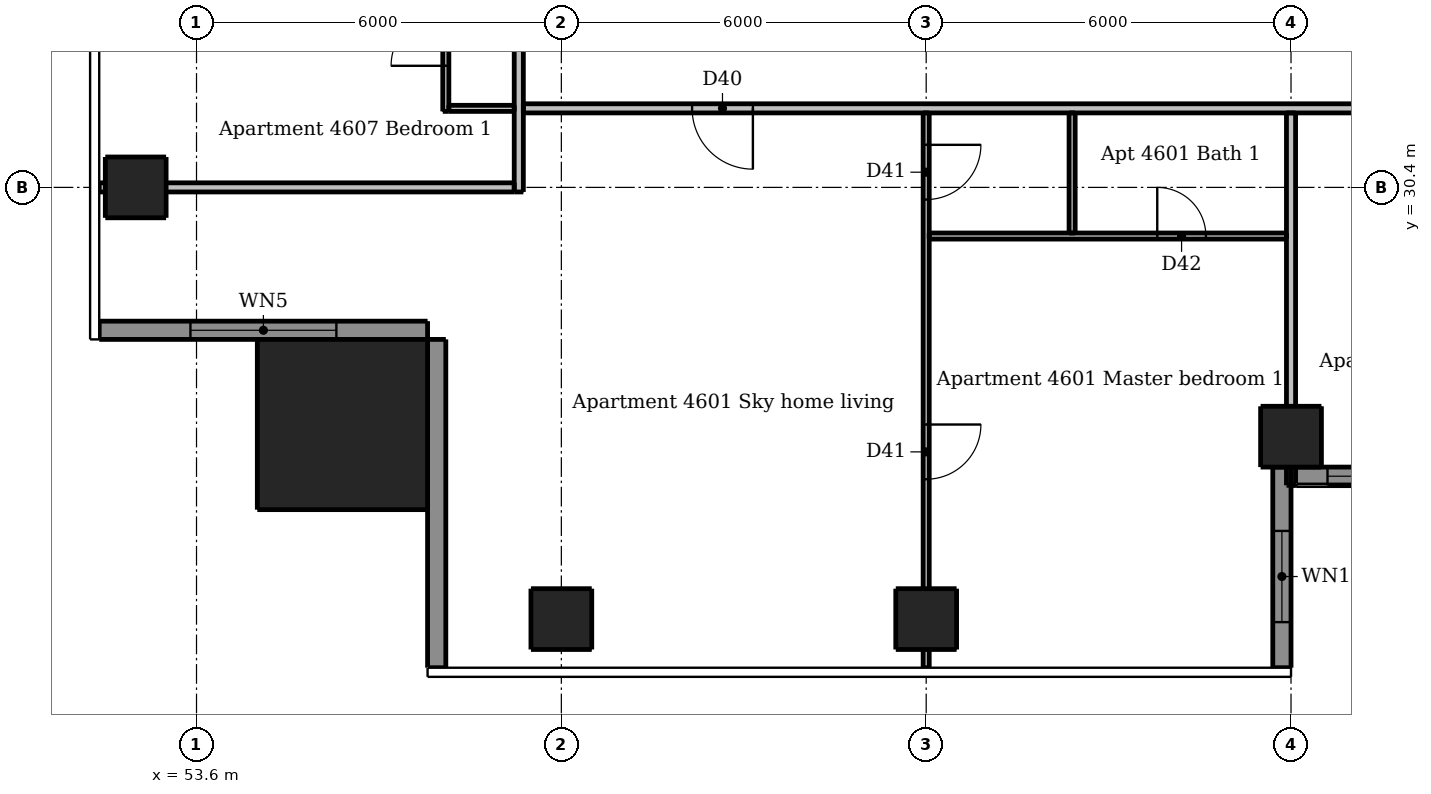
"""IFC4 building model, lengths in metres.
Left out: names, types, materials, properties, quantities, classifications, styles, units other than length and angle.
Written with IfcOpenShell. Run it as: python <this file> out.ifc"""

import sys

from ifc_helpers import new_model, si_unit, direction, frame, frame_2d, origin, origin_2d, place, context, subcontext, project, spatial, rectangle, extrude, element, fill, save


model = new_model("IFC4")
c1 = context("Model", 3, precision=1e-05, world=origin(), true_north=direction((0.0, 1.0)))
c2 = subcontext(c1, "Body", "Model", "MODEL_VIEW")
j1 = project(units=[si_unit("LENGTHUNIT", "METRE"), si_unit("PLANEANGLEUNIT", "RADIAN")], contexts=[c1])
p1 = place(None, origin())
s1 = spatial("IfcSite", under=j1, at=p1, CompositionType="ELEMENT")
p2 = place(p1, origin())
s2 = spatial("IfcBuilding", under=s1, at=p2, CompositionType="ELEMENT")
p3 = place(p2, frame((0.0, 0.0, 171.4)))
s3 = spatial("IfcBuildingStorey", under=s2, at=p3, CompositionType="ELEMENT", Elevation=171.4)
for number, where, z_axis, x_axis in (
    (1, (59.6, 23.3, 0.0), (0.0, 0.0, 1.0), (1.0, 0.0, 0.0)),
    (2, (65.6, 23.3, 0.0), (0.0, 0.0, 1.0), (1.0, 0.0, 0.0)),
    (3, (71.6, 26.3, 0.0), (0.0, 0.0, 1.0), (1.0, 0.0, 0.0)),
    (4, (52.6, 30.4, 0.0), (0.0, 0.0, 1.0), (1.0, 0.0, 0.0)),
):
    element("IfcColumn", number, at=place(p3, frame(where, z_axis=z_axis, x_axis=x_axis)), inside=s3, PredefinedType="COLUMN", context=c2, shape_type="SweptSolid", body=[
        extrude(rectangle(XDim=1.0, YDim=1.0, at=origin_2d()), origin(), (0.0, 0.0, 1.0), 3.05),
    ])
p4 = place(p3, frame((56.0, 26.5, 0.0), z_axis=(0.0, 0.0, 1.0), x_axis=(1.0, 0.0, 0.0)))
e5 = element("IfcColumn", 5, at=p4, inside=s3, PredefinedType="COLUMN", context=c2, shape_type="SweptSolid", body=[
    extrude(rectangle(XDim=2.8, YDim=2.8, at=origin_2d()), origin(), (0.0, 0.0, 1.0), 3.3),
])
p5 = place(p3, frame((71.45, 22.5, 0.0), z_axis=(0.0, 0.0, 1.0), x_axis=(0.0, 1.0, 0.0)))
e6 = element("IfcWall", 6, at=p5, inside=s3, PredefinedType="SOLIDWALL", context=c2, shape_type="SweptSolid", body=[
    extrude(rectangle(XDim=3.3, YDim=0.3, at=frame_2d((1.65, 0.0))), origin(), (0.0, 0.0, 1.0), 3.05),
])
p6 = place(p5, frame((0.75, 0.0, 0.9)))
e7 = element("IfcOpeningElement", 7, at=p6, cuts=e6, PredefinedType="OPENING", context=c2, shape_type="SweptSolid", body=[
    extrude(rectangle(XDim=1.5, YDim=1.5, at=frame_2d((0.75, 0.75))), frame((0.0, 0.16, 0.0), z_axis=(0.0, -1.0, 0.0), x_axis=(1.0, 0.0, 0.0)), (0.0, 0.0, 1.0), 0.32),
])
p7 = place(p3, frame((52.0, 28.05, 0.0), z_axis=(0.0, 0.0, 1.0), x_axis=(1.0, 0.0, 0.0)))
e8 = element("IfcWall", 8, at=p7, inside=s3, PredefinedType="SOLIDWALL", context=c2, shape_type="SweptSolid", body=[
    extrude(rectangle(XDim=5.4, YDim=0.3, at=frame_2d((2.7, 0.0))), origin(), (0.0, 0.0, 1.0), 3.05),
])
p8 = place(p7, frame((1.5, 0.0, 0.15)))
e9 = element("IfcOpeningElement", 9, at=p8, cuts=e8, PredefinedType="OPENING", context=c2, shape_type="SweptSolid", body=[
    extrude(rectangle(XDim=2.4, YDim=2.1, at=frame_2d((1.2, 1.05))), frame((0.0, 0.16, 0.0), z_axis=(0.0, -1.0, 0.0), x_axis=(1.0, 0.0, 0.0)), (0.0, 0.0, 1.0), 0.32),
])
p9 = place(p3, frame((57.55, 27.9, 0.0), z_axis=(0.0, 0.0, 1.0), x_axis=(0.0, -1.0, 0.0)))
e10 = element("IfcWall", 10, at=p9, inside=s3, PredefinedType="SOLIDWALL", context=c2, shape_type="SweptSolid", body=[
    extrude(rectangle(XDim=5.4, YDim=0.3, at=frame_2d((2.7, 0.0))), origin(), (0.0, 0.0, 1.0), 3.05),
])
p10 = place(p3, frame((71.6, 25.65, 0.0), z_axis=(0.0, 0.0, 1.0), x_axis=(1.0, 0.0, 0.0)))
e11 = element("IfcWall", 11, at=p10, inside=s3, PredefinedType="SOLIDWALL", context=c2, shape_type="SweptSolid", body=[
    extrude(rectangle(XDim=6.0, YDim=0.3, at=frame_2d((3.0, 0.0))), origin(), (0.0, 0.0, 1.0), 3.05),
])
p11 = place(p10, frame((0.6, 0.0, 0.15)))
e12 = element("IfcOpeningElement", 12, at=p11, cuts=e11, PredefinedType="OPENING", context=c2, shape_type="SweptSolid", body=[
    extrude(rectangle(XDim=1.8, YDim=2.1, at=frame_2d((0.9, 1.05))), frame((0.0, 0.16, 0.0), z_axis=(0.0, -1.0, 0.0), x_axis=(1.0, 0.0, 0.0)), (0.0, 0.0, 1.0), 0.32),
])
p12 = place(p10, frame((3.6, 0.0, 0.15)))
e13 = element("IfcOpeningElement", 13, at=p12, cuts=e11, PredefinedType="OPENING", context=c2, shape_type="SweptSolid", body=[
    extrude(rectangle(XDim=1.8, YDim=2.1, at=frame_2d((0.9, 1.05))), frame((0.0, 0.16, 0.0), z_axis=(0.0, -1.0, 0.0), x_axis=(1.0, 0.0, 0.0)), (0.0, 0.0, 1.0), 0.32),
])
p13 = place(p3, frame((57.7, 31.65, 0.0), z_axis=(0.0, 0.0, 1.0), x_axis=(0.0, 1.0, 0.0)))
e14 = element("IfcWall", 14, at=p13, inside=s3, PredefinedType="PARTITIONING", context=c2, shape_type="SweptSolid", body=[
    extrude(rectangle(XDim=16.675, YDim=0.1, at=frame_2d((8.337, 0.0))), origin(), (0.0, 0.0, 1.0), 3.05),
])
p14 = place(p13, frame((12.1, 0.0, 0.0)))
e15 = element("IfcOpeningElement", 15, at=p14, cuts=e14, PredefinedType="OPENING", context=c2, shape_type="SweptSolid", body=[
    extrude(rectangle(XDim=0.9, YDim=2.1, at=frame_2d((0.45, 1.05))), frame((0.0, 0.06, 0.0), z_axis=(0.0, -1.0, 0.0), x_axis=(1.0, 0.0, 0.0)), (0.0, 0.0, 1.0), 0.12),
])
p15 = place(p13, frame((15.1, 0.0, 0.0)))
e16 = element("IfcOpeningElement", 16, at=p15, cuts=e14, PredefinedType="OPENING", context=c2, shape_type="SweptSolid", body=[
    extrude(rectangle(XDim=0.9, YDim=2.1, at=frame_2d((0.45, 1.05))), frame((0.0, 0.06, 0.0), z_axis=(0.0, -1.0, 0.0), x_axis=(1.0, 0.0, 0.0)), (0.0, 0.0, 1.0), 0.12),
])
p16 = place(p13, frame((0.75, 0.0, 0.0)))
e17 = element("IfcOpeningElement", 17, at=p16, cuts=e14, PredefinedType="OPENING", context=c2, shape_type="SweptSolid", body=[
    extrude(rectangle(XDim=0.9, YDim=2.1, at=frame_2d((0.45, 1.05))), frame((0.0, 0.06, 0.0), z_axis=(0.0, -1.0, 0.0), x_axis=(1.0, 0.0, 0.0)), (0.0, 0.0, 1.0), 0.12),
])
p17 = place(p13, frame((6.1, 0.0, 0.0)))
e18 = element("IfcOpeningElement", 18, at=p17, cuts=e14, PredefinedType="OPENING", context=c2, shape_type="SweptSolid", body=[
    extrude(rectangle(XDim=0.9, YDim=2.1, at=frame_2d((0.45, 1.05))), frame((0.0, 0.06, 0.0), z_axis=(0.0, -1.0, 0.0), x_axis=(1.0, 0.0, 0.0)), (0.0, 0.0, 1.0), 0.12),
])
p18 = place(p13, frame((3.15, 0.0, 0.0)))
e19 = element("IfcOpeningElement", 19, at=p18, cuts=e14, PredefinedType="OPENING", context=c2, shape_type="SweptSolid", body=[
    extrude(rectangle(XDim=0.8, YDim=2.1, at=frame_2d((0.4, 1.05))), frame((0.0, 0.06, 0.0), z_axis=(0.0, -1.0, 0.0), x_axis=(1.0, 0.0, 0.0)), (0.0, 0.0, 1.0), 0.12),
])
p19 = place(p13, frame((9.15, 0.0, 0.0)))
e20 = element("IfcOpeningElement", 20, at=p19, cuts=e14, PredefinedType="OPENING", context=c2, shape_type="SweptSolid", body=[
    extrude(rectangle(XDim=0.8, YDim=2.1, at=frame_2d((0.4, 1.05))), frame((0.0, 0.06, 0.0), z_axis=(0.0, -1.0, 0.0), x_axis=(1.0, 0.0, 0.0)), (0.0, 0.0, 1.0), 0.12),
])
p20 = place(p3, frame((65.6, 31.625, 0.0), z_axis=(0.0, 0.0, 1.0), x_axis=(0.0, -1.0, 0.0)))
e21 = element("IfcWall", 21, at=p20, inside=s3, PredefinedType="PARTITIONING", context=c2, shape_type="SweptSolid", body=[
    extrude(rectangle(XDim=9.125, YDim=0.1, at=frame_2d((4.562, 0.0))), origin(), (0.0, 0.0, 1.0), 2.516),
])
p21 = place(p20, frame((0.525, 0.0, 0.0)))
e22 = element("IfcOpeningElement", 22, at=p21, cuts=e21, PredefinedType="OPENING", context=c2, shape_type="SweptSolid", body=[
    extrude(rectangle(XDim=0.9, YDim=2.1, at=frame_2d((0.45, 1.05))), frame((0.0, 0.06, 0.0), z_axis=(0.0, -1.0, 0.0), x_axis=(1.0, 0.0, 0.0)), (0.0, 0.0, 1.0), 0.12),
])
p22 = place(p20, frame((5.125, 0.0, 0.0)))
e23 = element("IfcOpeningElement", 23, at=p22, cuts=e21, PredefinedType="OPENING", context=c2, shape_type="SweptSolid", body=[
    extrude(rectangle(XDim=0.9, YDim=2.1, at=frame_2d((0.45, 1.05))), frame((0.0, 0.06, 0.0), z_axis=(0.0, -1.0, 0.0), x_axis=(1.0, 0.0, 0.0)), (0.0, 0.0, 1.0), 0.12),
])
p23 = place(p3, frame((68.0, 29.65, 0.0), z_axis=(0.0, 0.0, 1.0), x_axis=(0.0, 1.0, 0.0)))
e24 = element("IfcWall", 24, at=p23, inside=s3, PredefinedType="PARTITIONING", context=c2, shape_type="SweptSolid", body=[
    extrude(rectangle(XDim=1.975, YDim=0.1, at=frame_2d((0.988, 0.0))), origin(), (0.0, 0.0, 1.0), 3.05),
])
p24 = place(p3, frame((57.75, 31.7, 0.0), z_axis=(0.0, 0.0, 1.0), x_axis=(1.0, 0.0, 0.0)))
e25 = element("IfcWall", 25, at=p24, inside=s3, PredefinedType="PARTITIONING", context=c2, shape_type="SweptSolid", body=[
    extrude(rectangle(XDim=1.075, YDim=0.1, at=frame_2d((0.538, 0.0))), origin(), (0.0, 0.0, 1.0), 3.05),
])
p25 = place(p3, frame((65.65, 29.6, 0.0), z_axis=(0.0, 0.0, 1.0), x_axis=(1.0, 0.0, 0.0)))
e26 = element("IfcWall", 26, at=p25, inside=s3, PredefinedType="PARTITIONING", context=c2, shape_type="SweptSolid", body=[
    extrude(rectangle(XDim=5.875, YDim=0.1, at=frame_2d((2.938, 0.0))), origin(), (0.0, 0.0, 1.0), 3.05),
])
p26 = place(p25, frame((3.75, 0.0, 0.0)))
e27 = element("IfcOpeningElement", 27, at=p26, cuts=e26, PredefinedType="OPENING", context=c2, shape_type="SweptSolid", body=[
    extrude(rectangle(XDim=0.8, YDim=2.1, at=frame_2d((0.4, 1.05))), frame((0.0, 0.06, 0.0), z_axis=(0.0, -1.0, 0.0), x_axis=(1.0, 0.0, 0.0)), (0.0, 0.0, 1.0), 0.12),
])
p27 = place(p3, frame((58.9, 30.325, 0.0), z_axis=(0.0, 0.0, 1.0), x_axis=(0.0, 1.0, 0.0)))
e28 = element("IfcWall", 28, at=p27, inside=s3, PredefinedType="PARTITIONING", context=c2, shape_type="SweptSolid", body=[
    extrude(rectangle(XDim=30.85, YDim=0.15, at=frame_2d((15.425, 0.0))), origin(), (0.0, 0.0, 1.0), 3.05),
])
p28 = place(p27, frame((9.225, 0.0, 0.0)))
e29 = element("IfcOpeningElement", 29, at=p28, cuts=e28, PredefinedType="OPENING", context=c2, shape_type="SweptSolid", body=[
    extrude(rectangle(XDim=1.0, YDim=2.1, at=frame_2d((0.5, 1.05))), frame((0.0, 0.085, 0.0), z_axis=(0.0, -1.0, 0.0), x_axis=(1.0, 0.0, 0.0)), (0.0, 0.0, 1.0), 0.17),
])
p29 = place(p27, frame((26.925, 0.0, 0.0)))
e30 = element("IfcOpeningElement", 30, at=p29, cuts=e28, PredefinedType="OPENING", context=c2, shape_type="SweptSolid", body=[
    extrude(rectangle(XDim=1.0, YDim=2.1, at=frame_2d((0.5, 1.05))), frame((0.0, 0.085, 0.0), z_axis=(0.0, -1.0, 0.0), x_axis=(1.0, 0.0, 0.0)), (0.0, 0.0, 1.0), 0.17),
])
p30 = place(p3, frame((71.6, 25.5, 0.0), z_axis=(0.0, 0.0, 1.0), x_axis=(0.0, 1.0, 0.0)))
e31 = element("IfcWall", 31, at=p30, inside=s3, PredefinedType="PARTITIONING", context=c2, shape_type="SweptSolid", body=[
    extrude(rectangle(XDim=6.125, YDim=0.15, at=frame_2d((3.062, 0.0))), origin(), (0.0, 0.0, 1.0), 2.59),
])
p31 = place(p3, frame((89.525, 31.7, 0.0), z_axis=(0.0, 0.0, 1.0), x_axis=(-1.0, 0.0, 0.0)))
e32 = element("IfcWall", 32, at=p31, inside=s3, PredefinedType="PARTITIONING", context=c2, shape_type="SweptSolid", body=[
    extrude(rectangle(XDim=30.55, YDim=0.15, at=frame_2d((15.275, 0.0))), origin(), (0.0, 0.0, 1.0), 3.05),
])
p32 = place(p31, frame((26.775, 0.0, 0.0)))
e33 = element("IfcOpeningElement", 33, at=p32, cuts=e32, PredefinedType="OPENING", context=c2, shape_type="SweptSolid", body=[
    extrude(rectangle(XDim=1.0, YDim=2.1, at=frame_2d((0.5, 1.05))), frame((0.0, 0.085, 0.0), z_axis=(0.0, -1.0, 0.0), x_axis=(1.0, 0.0, 0.0)), (0.0, 0.0, 1.0), 0.17),
])
p33 = place(p31, frame((8.425, 0.0, 0.0)))
e34 = element("IfcOpeningElement", 34, at=p33, cuts=e32, PredefinedType="OPENING", context=c2, shape_type="SweptSolid", body=[
    extrude(rectangle(XDim=1.0, YDim=2.1, at=frame_2d((0.5, 1.05))), frame((0.0, 0.085, 0.0), z_axis=(0.0, -1.0, 0.0), x_axis=(1.0, 0.0, 0.0)), (0.0, 0.0, 1.0), 0.17),
])
p34 = place(p3, frame((52.0, 30.4, 0.0), z_axis=(0.0, 0.0, 1.0), x_axis=(1.0, 0.0, 0.0)))
e35 = element("IfcWall", 35, at=p34, inside=s3, PredefinedType="PARTITIONING", context=c2, shape_type="SweptSolid", body=[
    extrude(rectangle(XDim=6.825, YDim=0.15, at=frame_2d((3.413, 0.0))), origin(), (0.0, 0.0, 1.0), 2.647),
])
p35 = place(p6, origin())
e36 = element("IfcWindow", 36, at=p35, inside=s3, PartitioningType="DOUBLE_PANEL_VERTICAL", PredefinedType="WINDOW", context=c2, shape_type="SweptSolid", body=[
    extrude(rectangle(XDim=1.5, YDim=1.5, at=frame_2d((0.75, 0.75))), frame((0.0, 0.03, 0.0), z_axis=(0.0, -1.0, 0.0), x_axis=(1.0, 0.0, 0.0)), (0.0, 0.0, 1.0), 0.06),
])
fill(e7, e36)
p36 = place(p8, origin())
e37 = element("IfcWindow", 37, at=p36, inside=s3, PartitioningType="DOUBLE_PANEL_VERTICAL", PredefinedType="WINDOW", context=c2, shape_type="SweptSolid", body=[
    extrude(rectangle(XDim=2.4, YDim=2.1, at=frame_2d((1.2, 1.05))), frame((0.0, 0.03, 0.0), z_axis=(0.0, -1.0, 0.0), x_axis=(1.0, 0.0, 0.0)), (0.0, 0.0, 1.0), 0.06),
])
fill(e9, e37)
p37 = place(p11, origin())
e38 = element("IfcWindow", 38, at=p37, inside=s3, PartitioningType="DOUBLE_PANEL_VERTICAL", PredefinedType="WINDOW", context=c2, shape_type="SweptSolid", body=[
    extrude(rectangle(XDim=1.8, YDim=2.1, at=frame_2d((0.9, 1.05))), frame((0.0, 0.03, 0.0), z_axis=(0.0, -1.0, 0.0), x_axis=(1.0, 0.0, 0.0)), (0.0, 0.0, 1.0), 0.06),
])
fill(e12, e38)
p38 = place(p32, origin())
e39 = element("IfcDoor", 39, at=p38, inside=s3, OperationType="SINGLE_SWING_LEFT", PredefinedType="DOOR", context=c2, shape_type="SweptSolid", body=[
    extrude(rectangle(XDim=1.0, YDim=2.1, at=frame_2d((0.5, 1.05))), frame((0.0, 0.025, 0.0), z_axis=(0.0, -1.0, 0.0), x_axis=(1.0, 0.0, 0.0)), (0.0, 0.0, 1.0), 0.05),
])
fill(e33, e39)
p39 = place(p21, origin())
e40 = element("IfcDoor", 40, at=p39, inside=s3, OperationType="SINGLE_SWING_LEFT", PredefinedType="DOOR", context=c2, shape_type="SweptSolid", body=[
    extrude(rectangle(XDim=0.9, YDim=2.1, at=frame_2d((0.45, 1.05))), frame((0.0, 0.025, 0.0), z_axis=(0.0, -1.0, 0.0), x_axis=(1.0, 0.0, 0.0)), (0.0, 0.0, 1.0), 0.05),
])
fill(e22, e40)
p40 = place(p22, origin())
e41 = element("IfcDoor", 41, at=p40, inside=s3, OperationType="SINGLE_SWING_LEFT", PredefinedType="DOOR", context=c2, shape_type="SweptSolid", body=[
    extrude(rectangle(XDim=0.9, YDim=2.1, at=frame_2d((0.45, 1.05))), frame((0.0, 0.025, 0.0), z_axis=(0.0, -1.0, 0.0), x_axis=(1.0, 0.0, 0.0)), (0.0, 0.0, 1.0), 0.05),
])
fill(e23, e41)
p41 = place(p26, origin())
e42 = element("IfcDoor", 42, at=p41, inside=s3, OperationType="SINGLE_SWING_LEFT", PredefinedType="DOOR", context=c2, shape_type="SweptSolid", body=[
    extrude(rectangle(XDim=0.8, YDim=2.1, at=frame_2d((0.4, 1.05))), frame((0.0, 0.025, 0.0), z_axis=(0.0, -1.0, 0.0), x_axis=(1.0, 0.0, 0.0)), (0.0, 0.0, 1.0), 0.05),
])
fill(e27, e42)
p42 = place(p16, origin())
e43 = element("IfcDoor", 43, at=p42, inside=s3, OperationType="SINGLE_SWING_LEFT", PredefinedType="DOOR", context=c2, shape_type="SweptSolid", body=[
    extrude(rectangle(XDim=0.9, YDim=2.1, at=frame_2d((0.45, 1.05))), frame((0.0, 0.025, 0.0), z_axis=(0.0, -1.0, 0.0), x_axis=(1.0, 0.0, 0.0)), (0.0, 0.0, 1.0), 0.05),
])
fill(e17, e43)
save(model, sys.argv[1])
